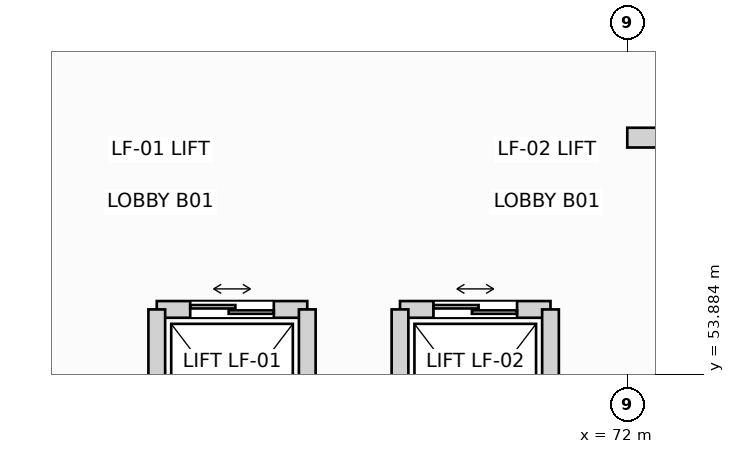
"""IFC4 building model, lengths in metres.
Left out: names, types, materials, properties, quantities, classifications, styles, units other than length and angle.
Written with IfcOpenShell. Run it as: python <this file> out.ifc"""

import sys

from ifc_helpers import new_model, si_unit, direction, frame, frame_2d, origin, place, context, subcontext, project, spatial, rectangle, extrude, element, fill, save


model = new_model("IFC4")
c1 = context("Model", 3, precision=1e-05, world=origin(), true_north=direction((0.0, 1.0)))
c2 = subcontext(c1, "Body", "Model", "MODEL_VIEW")
j1 = project(units=[si_unit("LENGTHUNIT", "METRE"), si_unit("PLANEANGLEUNIT", "RADIAN")], contexts=[c1])
p1 = place(None, origin())
s1 = spatial("IfcSite", under=j1, at=p1, CompositionType="ELEMENT")
p2 = place(p1, origin())
s2 = spatial("IfcBuilding", under=s1, at=p2, CompositionType="ELEMENT")
p3 = place(p2, frame((0.0, 0.0, -5.4)))
s3 = spatial("IfcBuildingStorey", under=s2, at=p3, CompositionType="ELEMENT", Elevation=-5.4)
p4 = place(p3, frame((65.81, 54.74, 0.0), z_axis=(0.0, 0.0, 1.0), x_axis=(1.0, 0.0, 0.0)))
e1 = element("IfcWall", 1, at=p4, inside=s3, PredefinedType="PARTITIONING", context=c2, shape_type="SweptSolid", body=[
    extrude(rectangle(XDim=1.98, YDim=0.22, at=frame_2d((0.99, 0.0))), origin(), (0.0, 0.0, 1.0), 5.045),
])
p5 = place(p4, frame((0.44, 0.0, 0.0)))
e2 = element("IfcOpeningElement", 2, at=p5, cuts=e1, PredefinedType="OPENING", context=c2, shape_type="SweptSolid", body=[
    extrude(rectangle(XDim=1.1, YDim=2.18, at=frame_2d((0.55, 1.09))), frame((0.0, 0.12, 0.0), z_axis=(0.0, -1.0, 0.0), x_axis=(1.0, 0.0, 0.0)), (0.0, 0.0, 1.0), 0.24),
])
for number, where, z_axis, x_axis in (
    (3, (65.81, 52.26, 0.0), (0.0, 0.0, 1.0), (0.0, 1.0, 0.0)),
    (4, (67.79, 52.26, 0.0), (0.0, 0.0, 1.0), (0.0, 1.0, 0.0)),
):
    element("IfcWall", number, at=place(p3, frame(where, z_axis=z_axis, x_axis=x_axis)), inside=s3, PredefinedType="PARTITIONING", context=c2, shape_type="SweptSolid", body=[
        extrude(rectangle(XDim=2.48, YDim=0.22, at=frame_2d((1.24, 0.0))), origin(), (0.0, 0.0, 1.0), 5.045),
    ])
p6 = place(p3, frame((69.01, 54.74, 0.0), z_axis=(0.0, 0.0, 1.0), x_axis=(1.0, 0.0, 0.0)))
e5 = element("IfcWall", 5, at=p6, inside=s3, PredefinedType="PARTITIONING", context=c2, shape_type="SweptSolid", body=[
    extrude(rectangle(XDim=1.98, YDim=0.22, at=frame_2d((0.99, 0.0))), origin(), (0.0, 0.0, 1.0), 5.045),
])
p7 = place(p6, frame((0.44, 0.0, 0.0)))
e6 = element("IfcOpeningElement", 6, at=p7, cuts=e5, PredefinedType="OPENING", context=c2, shape_type="SweptSolid", body=[
    extrude(rectangle(XDim=1.1, YDim=2.18, at=frame_2d((0.55, 1.09))), frame((0.0, 0.12, 0.0), z_axis=(0.0, -1.0, 0.0), x_axis=(1.0, 0.0, 0.0)), (0.0, 0.0, 1.0), 0.24),
])
for number, where, z_axis, x_axis in (
    (7, (69.01, 52.26, 0.0), (0.0, 0.0, 1.0), (0.0, 1.0, 0.0)),
    (8, (70.99, 52.26, 0.0), (0.0, 0.0, 1.0), (0.0, 1.0, 0.0)),
):
    element("IfcWall", number, at=place(p3, frame(where, z_axis=z_axis, x_axis=x_axis)), inside=s3, PredefinedType="PARTITIONING", context=c2, shape_type="SweptSolid", body=[
        extrude(rectangle(XDim=2.48, YDim=0.22, at=frame_2d((1.24, 0.0))), origin(), (0.0, 0.0, 1.0), 5.045),
    ])
p8 = place(p3, frame((72.0, 57.0, 0.0), z_axis=(0.0, 0.0, 1.0), x_axis=(1.0, 0.0, 0.0)))
e9 = element("IfcWall", 9, at=p8, inside=s3, PredefinedType="PARTITIONING", context=c2, shape_type="SweptSolid", body=[
    extrude(rectangle(XDim=9.0, YDim=0.26, at=frame_2d((4.5, 0.0))), origin(), (0.0, 0.0, 1.0), 4.495),
])
p9 = place(p8, frame((3.975, 0.0, 0.0)))
e10 = element("IfcOpeningElement", 10, at=p9, cuts=e9, PredefinedType="OPENING", context=c2, shape_type="SweptSolid", body=[
    extrude(rectangle(XDim=1.05, YDim=2.12, at=frame_2d((0.525, 1.06))), frame((0.0, 0.14, 0.0), z_axis=(0.0, -1.0, 0.0), x_axis=(1.0, 0.0, 0.0)), (0.0, 0.0, 1.0), 0.28),
])
p10 = place(p5, origin())
e11 = element("IfcDoor", 11, at=p10, inside=s3, OperationType="DOUBLE_DOOR_SLIDING", PredefinedType="DOOR", context=c2, shape_type="SweptSolid", body=[
    extrude(rectangle(XDim=1.1, YDim=2.18, at=frame_2d((0.55, 1.09))), frame((0.0, 0.025, 0.0), z_axis=(0.0, -1.0, 0.0), x_axis=(1.0, 0.0, 0.0)), (0.0, 0.0, 1.0), 0.05),
])
fill(e2, e11)
p11 = place(p7, origin())
e12 = element("IfcDoor", 12, at=p11, inside=s3, OperationType="DOUBLE_DOOR_SLIDING", PredefinedType="DOOR", context=c2, shape_type="SweptSolid", body=[
    extrude(rectangle(XDim=1.1, YDim=2.18, at=frame_2d((0.55, 1.09))), frame((0.0, 0.025, 0.0), z_axis=(0.0, -1.0, 0.0), x_axis=(1.0, 0.0, 0.0)), (0.0, 0.0, 1.0), 0.05),
])
fill(e6, e12)
save(model, sys.argv[1])
